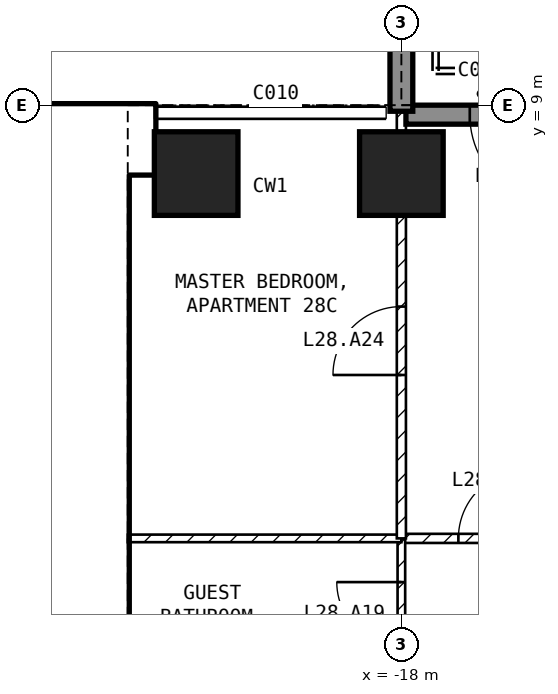
"""IFC4 building model, lengths in metres.
Left out: names, types, materials, properties, quantities, classifications, styles, units other than length and angle.
Written with IfcOpenShell. Run it as: python <this file> out.ifc"""

import sys

from ifc_helpers import new_model, si_unit, direction, frame, frame_2d, origin, origin_2d, place, context, subcontext, project, spatial, rectangle, extrude, element, fill, save


model = new_model("IFC4")
c1 = context("Model", 3, precision=1e-05, world=origin(), true_north=direction((0.0, 1.0)))
c2 = subcontext(c1, "Body", "Model", "MODEL_VIEW")
j1 = project(units=[si_unit("LENGTHUNIT", "METRE"), si_unit("PLANEANGLEUNIT", "RADIAN")], contexts=[c1])
p1 = place(None, origin())
s1 = spatial("IfcSite", under=j1, at=p1, CompositionType="ELEMENT")
p2 = place(p1, origin())
s2 = spatial("IfcBuilding", under=s1, at=p2, CompositionType="ELEMENT")
p3 = place(p2, frame((0.0, 0.0, 119.9)))
s3 = spatial("IfcBuildingStorey", under=s2, at=p3, CompositionType="ELEMENT", Elevation=119.9)
for number, where, z_axis, x_axis in (
    (1, (-20.7, 8.1, -0.25), (0.0, 0.0, 1.0), (1.0, 0.0, 0.0)),
    (2, (-18.0, 8.1, -0.25), (0.0, 0.0, 1.0), (1.0, 0.0, 0.0)),
):
    element("IfcColumn", number, at=place(p3, frame(where, z_axis=z_axis, x_axis=x_axis)), inside=s3, PredefinedType="COLUMN", context=c2, shape_type="SweptSolid", body=[
        extrude(rectangle(XDim=1.1, YDim=1.1, at=origin_2d()), origin(), (0.0, 0.0, 1.0), 3.5),
    ])
p4 = place(p3, frame((-15.65, 8.875, 0.0), z_axis=(0.0, 0.0, 1.0), x_axis=(-1.0, 0.0, 0.0)))
e3 = element("IfcWall", 3, at=p4, inside=s3, PredefinedType="SOLIDWALL", context=c2, shape_type="SweptSolid", body=[
    extrude(rectangle(XDim=2.29, YDim=0.25, at=frame_2d((1.145, 0.0))), origin(), (0.0, 0.0, 1.0), 3.25),
])
p5 = place(p4, frame((0.25, 0.0, 0.0)))
e4 = element("IfcOpeningElement", 4, at=p5, cuts=e3, PredefinedType="OPENING", context=c2, shape_type="SweptSolid", body=[
    extrude(rectangle(XDim=1.2, YDim=2.4, at=frame_2d((0.6, 1.2))), frame((0.0, 0.135, 0.0), z_axis=(0.0, -1.0, 0.0), x_axis=(1.0, 0.0, 0.0)), (0.0, 0.0, 1.0), 0.27),
])
p6 = place(p3, frame((-18.0, 8.92, 0.0), z_axis=(0.0, 0.0, 1.0), x_axis=(0.0, 1.0, 0.0)))
e5 = element("IfcWall", 5, at=p6, inside=s3, PredefinedType="SOLIDWALL", context=c2, shape_type="SweptSolid", body=[
    extrude(rectangle(XDim=2.82, YDim=0.3, at=frame_2d((1.41, 0.0))), origin(), (0.0, 0.0, 1.0), 3.25),
])
p7 = place(p3, frame((-29.45, 8.55, 0.0), z_axis=(0.0, 0.0, 1.0), x_axis=(1.0, 0.0, 0.0)))
e6 = element("IfcWall", 6, at=p7, inside=s3, PredefinedType="SHEAR", context=c2, shape_type="SweptSolid", body=[
    extrude(rectangle(XDim=8.2, YDim=0.9, at=frame_2d((4.1, 0.0))), origin(), (0.0, 0.0, 1.0), 3.25),
])
p8 = place(p3, frame((-21.825, 1.2, 0.0), z_axis=(0.0, 0.0, 1.0), x_axis=(0.0, 1.0, 0.0)))
e7 = element("IfcWall", 7, at=p8, inside=s3, PredefinedType="SHEAR", context=c2, shape_type="SweptSolid", body=[
    extrude(rectangle(XDim=6.9, YDim=0.45, at=frame_2d((3.45, 0.0))), origin(), (0.0, 0.0, 1.0), 3.25),
])
p9 = place(p3, frame((-28.35, 5.15, 0.0), z_axis=(0.0, 0.0, 1.0), x_axis=(1.0, 0.0, 0.0)))
e8 = element("IfcWall", 8, at=p9, inside=s3, PredefinedType="SOLIDWALL", context=c2, shape_type="SweptSolid", body=[
    extrude(rectangle(XDim=6.3, YDim=0.2, at=frame_2d((3.15, 0.0))), origin(), (0.0, 0.0, 1.0), 3.25),
])
p10 = place(p9, frame((5.1, 0.0, 0.0)))
e9 = element("IfcOpeningElement", 9, at=p10, cuts=e8, PredefinedType="OPENING", context=c2, shape_type="SweptSolid", body=[
    extrude(rectangle(XDim=1.0, YDim=2.1, at=frame_2d((0.5, 1.05))), frame((0.0, 0.11, 0.0), z_axis=(0.0, -1.0, 0.0), x_axis=(1.0, 0.0, 0.0)), (0.0, 0.0, 1.0), 0.22),
])
p11 = place(p3, frame((-18.0, 3.3, 0.0), z_axis=(0.0, 0.0, 1.0), x_axis=(1.0, 0.0, 0.0)))
e10 = element("IfcWall", 10, at=p11, inside=s3, PredefinedType="PARTITIONING", context=c2, shape_type="SweptSolid", body=[
    extrude(rectangle(XDim=9.06, YDim=0.12, at=frame_2d((4.53, 0.0))), origin(), (0.0, 0.0, 1.0), 3.25),
])
p12 = place(p11, frame((6.15, 0.0, 0.0)))
e11 = element("IfcOpeningElement", 11, at=p12, cuts=e10, PredefinedType="OPENING", context=c2, shape_type="SweptSolid", body=[
    extrude(rectangle(XDim=0.9, YDim=2.1, at=frame_2d((0.45, 1.05))), frame((0.0, 0.07, 0.0), z_axis=(0.0, -1.0, 0.0), x_axis=(1.0, 0.0, 0.0)), (0.0, 0.0, 1.0), 0.14),
])
p13 = place(p11, frame((0.75, 0.0, 0.0)))
e12 = element("IfcOpeningElement", 12, at=p13, cuts=e10, PredefinedType="OPENING", context=c2, shape_type="SweptSolid", body=[
    extrude(rectangle(XDim=0.9, YDim=2.1, at=frame_2d((0.45, 1.05))), frame((0.0, 0.07, 0.0), z_axis=(0.0, -1.0, 0.0), x_axis=(1.0, 0.0, 0.0)), (0.0, 0.0, 1.0), 0.14),
])
p14 = place(p3, frame((-18.0, 1.3, 0.0), z_axis=(0.0, 0.0, 1.0), x_axis=(0.0, 1.0, 0.0)))
e13 = element("IfcWall", 13, at=p14, inside=s3, PredefinedType="PARTITIONING", context=c2, shape_type="SweptSolid", body=[
    extrude(rectangle(XDim=2.0, YDim=0.1, at=frame_2d((1.0, 0.0))), origin(), (0.0, 0.0, 1.0), 2.414),
])
p15 = place(p14, frame((0.575, 0.0, 0.0)))
e14 = element("IfcOpeningElement", 14, at=p15, cuts=e13, PredefinedType="OPENING", context=c2, shape_type="SweptSolid", body=[
    extrude(rectangle(XDim=0.85, YDim=2.1, at=frame_2d((0.425, 1.05))), frame((0.0, 0.06, 0.0), z_axis=(0.0, -1.0, 0.0), x_axis=(1.0, 0.0, 0.0)), (0.0, 0.0, 1.0), 0.12),
])
p16 = place(p3, frame((-21.6, 3.3, 0.0), z_axis=(0.0, 0.0, 1.0), x_axis=(1.0, 0.0, 0.0)))
e15 = element("IfcWall", 15, at=p16, inside=s3, PredefinedType="PARTITIONING", context=c2, shape_type="SweptSolid", body=[
    extrude(rectangle(XDim=3.6, YDim=0.1, at=frame_2d((1.8, 0.0))), origin(), (0.0, 0.0, 1.0), 3.25),
])
p17 = place(p3, frame((-18.0, 3.3, 0.0), z_axis=(0.0, 0.0, 1.0), x_axis=(0.0, 1.0, 0.0)))
e16 = element("IfcWall", 16, at=p17, inside=s3, PredefinedType="PARTITIONING", context=c2, shape_type="SweptSolid", body=[
    extrude(rectangle(XDim=5.62, YDim=0.12, at=frame_2d((2.81, 0.0))), origin(), (0.0, 0.0, 1.0), 2.414),
])
p18 = place(p17, frame((2.15, 0.0, 0.0)))
e17 = element("IfcOpeningElement", 17, at=p18, cuts=e16, PredefinedType="OPENING", context=c2, shape_type="SweptSolid", body=[
    extrude(rectangle(XDim=0.9, YDim=2.1, at=frame_2d((0.45, 1.05))), frame((0.0, 0.07, 0.0), z_axis=(0.0, -1.0, 0.0), x_axis=(1.0, 0.0, 0.0)), (0.0, 0.0, 1.0), 0.14),
])
p19 = place(p5, origin())
e18 = element("IfcDoor", 18, at=p19, inside=s3, OperationType="SINGLE_SWING_LEFT", PredefinedType="DOOR", context=c2, shape_type="SweptSolid", body=[
    extrude(rectangle(XDim=1.2, YDim=2.4, at=frame_2d((0.6, 1.2))), frame((0.0, 0.025, 0.0), z_axis=(0.0, -1.0, 0.0), x_axis=(1.0, 0.0, 0.0)), (0.0, 0.0, 1.0), 0.05),
])
fill(e4, e18)
p20 = place(p10, origin())
e19 = element("IfcDoor", 19, at=p20, inside=s3, OperationType="SINGLE_SWING_LEFT", PredefinedType="DOOR", context=c2, shape_type="SweptSolid", body=[
    extrude(rectangle(XDim=1.0, YDim=2.1, at=frame_2d((0.5, 1.05))), frame((0.0, 0.025, 0.0), z_axis=(0.0, -1.0, 0.0), x_axis=(1.0, 0.0, 0.0)), (0.0, 0.0, 1.0), 0.05),
])
fill(e9, e19)
p21 = place(p15, origin())
e20 = element("IfcDoor", 20, at=p21, inside=s3, OperationType="SINGLE_SWING_RIGHT", PredefinedType="DOOR", context=c2, shape_type="SweptSolid", body=[
    extrude(rectangle(XDim=0.85, YDim=2.1, at=frame_2d((0.425, 1.05))), frame((0.0, 0.025, 0.0), z_axis=(0.0, -1.0, 0.0), x_axis=(1.0, 0.0, 0.0)), (0.0, 0.0, 1.0), 0.05),
])
fill(e14, e20)
p22 = place(p13, origin())
e21 = element("IfcDoor", 21, at=p22, inside=s3, OperationType="SINGLE_SWING_RIGHT", PredefinedType="DOOR", context=c2, shape_type="SweptSolid", body=[
    extrude(rectangle(XDim=0.9, YDim=2.1, at=frame_2d((0.45, 1.05))), frame((0.0, 0.025, 0.0), z_axis=(0.0, -1.0, 0.0), x_axis=(1.0, 0.0, 0.0)), (0.0, 0.0, 1.0), 0.05),
])
fill(e12, e21)
p23 = place(p18, origin())
e22 = element("IfcDoor", 22, at=p23, inside=s3, OperationType="SINGLE_SWING_LEFT", PredefinedType="DOOR", context=c2, shape_type="SweptSolid", body=[
    extrude(rectangle(XDim=0.9, YDim=2.1, at=frame_2d((0.45, 1.05))), frame((0.0, 0.025, 0.0), z_axis=(0.0, -1.0, 0.0), x_axis=(1.0, 0.0, 0.0)), (0.0, 0.0, 1.0), 0.05),
])
fill(e17, e22)
save(model, sys.argv[1])
